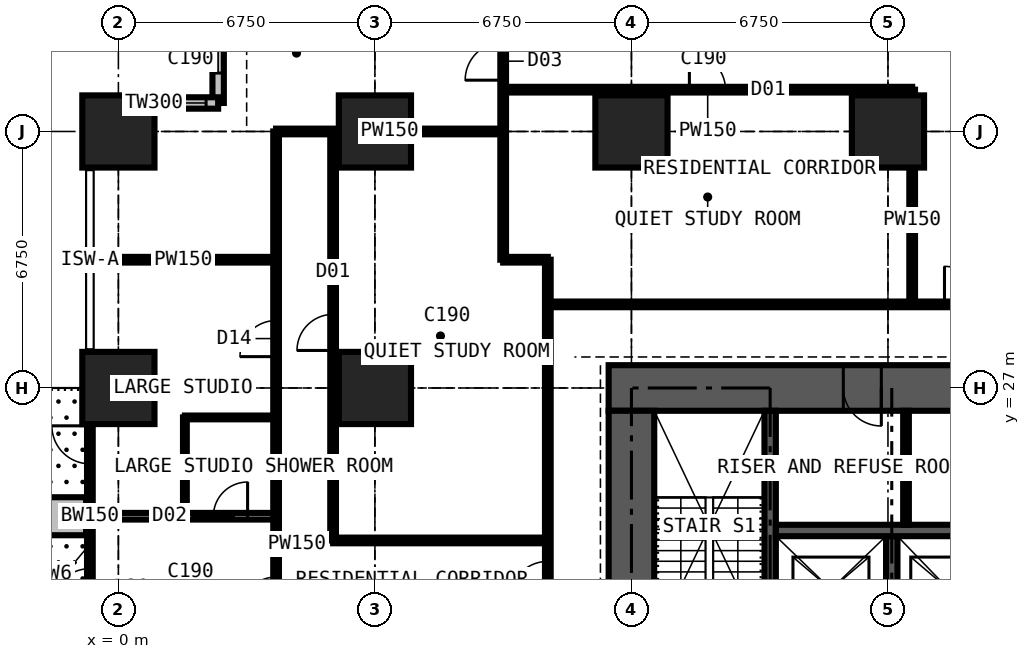
"""IFC4 building model, lengths in metres.
Left out: names, types, materials, properties, quantities, classifications, styles, units other than length and angle.
Written with IfcOpenShell. Run it as: python <this file> out.ifc"""

import sys

from ifc_helpers import new_model, si_unit, direction, frame, frame_2d, origin, origin_2d, place, context, subcontext, project, spatial, rectangle, extrude, element, fill, save


model = new_model("IFC4")
c1 = context("Model", 3, precision=1e-05, world=origin(), true_north=direction((0.0, 1.0)))
c2 = subcontext(c1, "Body", "Model", "MODEL_VIEW")
j1 = project(units=[si_unit("LENGTHUNIT", "METRE"), si_unit("PLANEANGLEUNIT", "RADIAN")], contexts=[c1])
p1 = place(None, origin())
s1 = spatial("IfcSite", under=j1, at=p1, CompositionType="ELEMENT")
p2 = place(p1, origin())
s2 = spatial("IfcBuilding", under=s1, at=p2, CompositionType="ELEMENT")
p3 = place(p2, frame((0.0, 0.0, 28.8)))
s3 = spatial("IfcBuildingStorey", under=s2, at=p3, CompositionType="ELEMENT", Elevation=28.8)
for number, where, z_axis, x_axis in (
    (1, (0.0, 27.0, 0.0), (0.0, 0.0, 1.0), (1.0, 0.0, 0.0)),
    (2, (0.0, 33.75, 0.0), (0.0, 0.0, 1.0), (1.0, 0.0, 0.0)),
    (3, (6.75, 27.0, 0.0), (0.0, 0.0, 1.0), (1.0, 0.0, 0.0)),
    (4, (6.75, 33.75, 0.0), (0.0, 0.0, 1.0), (1.0, 0.0, 0.0)),
    (5, (13.5, 33.75, 0.0), (0.0, 0.0, 1.0), (1.0, 0.0, 0.0)),
    (6, (20.25, 33.75, 0.0), (0.0, 0.0, 1.0), (1.0, 0.0, 0.0)),
):
    element("IfcColumn", number, at=place(p3, frame(where, z_axis=z_axis, x_axis=x_axis)), inside=s3, PredefinedType="COLUMN", context=c2, shape_type="SweptSolid", body=[
        extrude(rectangle(XDim=1.9, YDim=1.9, at=origin_2d()), origin(), (0.0, 0.0, 1.0), 3.6),
    ])
p4 = place(p3, frame((27.6, 27.0, 0.0), z_axis=(0.0, 0.0, 1.0), x_axis=(-1.0, 0.0, 0.0)))
e7 = element("IfcWall", 7, at=p4, inside=s3, PredefinedType="SHEAR", context=c2, shape_type="SweptSolid", body=[
    extrude(rectangle(XDim=14.7, YDim=1.2, at=frame_2d((7.35, 0.0))), origin(), (0.0, 0.0, 1.0), 3.6),
])
p5 = place(p4, frame((4.55, 0.0, 0.0)))
e8 = element("IfcOpeningElement", 8, at=p5, cuts=e7, PredefinedType="OPENING", context=c2, shape_type="SweptSolid", body=[
    extrude(rectangle(XDim=0.9, YDim=2.2, at=frame_2d((0.45, 1.1))), frame((0.0, 0.61, 0.0), z_axis=(0.0, -1.0, 0.0), x_axis=(1.0, 0.0, 0.0)), (0.0, 0.0, 1.0), 1.22),
])
p6 = place(p4, frame((7.525, 0.0, 0.0)))
e9 = element("IfcOpeningElement", 9, at=p6, cuts=e7, PredefinedType="OPENING", context=c2, shape_type="SweptSolid", body=[
    extrude(rectangle(XDim=1.0, YDim=2.2, at=frame_2d((0.5, 1.1))), frame((0.0, 0.61, 0.0), z_axis=(0.0, -1.0, 0.0), x_axis=(1.0, 0.0, 0.0)), (0.0, 0.0, 1.0), 1.22),
])
p7 = place(p3, frame((13.5, 26.4, 0.0), z_axis=(0.0, 0.0, 1.0), x_axis=(0.0, -1.0, 0.0)))
e10 = element("IfcWall", 10, at=p7, inside=s3, PredefinedType="SHEAR", context=c2, shape_type="SweptSolid", body=[
    extrude(rectangle(XDim=12.3, YDim=1.2, at=frame_2d((6.15, 0.0))), origin(), (0.0, 0.0, 1.0), 3.6),
])
p8 = place(p7, frame((7.45, 0.0, 0.0)))
e11 = element("IfcOpeningElement", 11, at=p8, cuts=e10, PredefinedType="OPENING", context=c2, shape_type="SweptSolid", body=[
    extrude(rectangle(XDim=1.2, YDim=2.2, at=frame_2d((0.6, 1.1))), frame((0.0, 0.61, 0.0), z_axis=(0.0, -1.0, 0.0), x_axis=(1.0, 0.0, 0.0)), (0.0, 0.0, 1.0), 1.22),
])
p9 = place(p3, frame((2.625, 37.875, 0.0), z_axis=(0.0, 0.0, 1.0), x_axis=(0.0, -1.0, 0.0)))
e12 = element("IfcWall", 12, at=p9, inside=s3, PredefinedType="SOLIDWALL", context=c2, shape_type="SweptSolid", body=[
    extrude(rectangle(XDim=3.375, YDim=0.3, at=frame_2d((1.688, 0.0))), origin(), (0.0, 0.0, 1.0), 3.375),
])
p10 = place(p9, frame((0.788, 0.0, 0.6)))
e13 = element("IfcOpeningElement", 13, at=p10, cuts=e12, PredefinedType="OPENING", context=c2, shape_type="SweptSolid", body=[
    extrude(rectangle(XDim=1.8, YDim=2.1, at=frame_2d((0.9, 1.05))), frame((0.0, 0.16, 0.0), z_axis=(0.0, -1.0, 0.0), x_axis=(1.0, 0.0, 0.0)), (0.0, 0.0, 1.0), 0.32),
])
p11 = place(p3, frame((2.625, 34.5, 0.0), z_axis=(0.0, 0.0, 1.0), x_axis=(-1.0, 0.0, 0.0)))
e14 = element("IfcWall", 14, at=p11, inside=s3, PredefinedType="SOLIDWALL", context=c2, shape_type="SweptSolid", body=[
    extrude(rectangle(XDim=3.375, YDim=0.3, at=frame_2d((1.688, 0.0))), origin(), (0.0, 0.0, 1.0), 3.375),
])
p12 = place(p11, frame((0.317, 0.0, 0.9)))
e15 = element("IfcOpeningElement", 15, at=p12, cuts=e14, PredefinedType="OPENING", context=c2, shape_type="SweptSolid", body=[
    extrude(rectangle(XDim=1.2, YDim=1.8, at=frame_2d((0.6, 0.9))), frame((0.0, 0.16, 0.0), z_axis=(0.0, -1.0, 0.0), x_axis=(1.0, 0.0, 0.0)), (0.0, 0.0, 1.0), 0.32),
])
p13 = place(p3, frame((-0.75, 20.25, 0.0), z_axis=(0.0, 0.0, 1.0), x_axis=(0.0, 1.0, 0.0)))
e16 = element("IfcWall", 16, at=p13, inside=s3, PredefinedType="SOLIDWALL", context=c2, shape_type="SweptSolid", body=[
    extrude(rectangle(XDim=6.75, YDim=0.15, at=frame_2d((3.375, 0.0))), origin(), (0.0, 0.0, 1.0), 3.375),
])
p14 = place(p13, frame((0.996, 0.0, 0.0)))
e17 = element("IfcOpeningElement", 17, at=p14, cuts=e16, PredefinedType="OPENING", context=c2, shape_type="SweptSolid", body=[
    extrude(rectangle(XDim=1.0, YDim=2.2, at=frame_2d((0.5, 1.1))), frame((0.0, 0.085, 0.0), z_axis=(0.0, -1.0, 0.0), x_axis=(1.0, 0.0, 0.0)), (0.0, 0.0, 1.0), 0.17),
])
p15 = place(p13, frame((2.042, 0.0, 0.9)))
e18 = element("IfcOpeningElement", 18, at=p15, cuts=e16, PredefinedType="OPENING", context=c2, shape_type="SweptSolid", body=[
    extrude(rectangle(XDim=1.2, YDim=1.8, at=frame_2d((0.6, 0.9))), frame((0.0, 0.085, 0.0), z_axis=(0.0, -1.0, 0.0), x_axis=(1.0, 0.0, 0.0)), (0.0, 0.0, 1.0), 0.17),
])
p16 = place(p13, frame((4.754, 0.0, 0.0)))
e19 = element("IfcOpeningElement", 19, at=p16, cuts=e16, PredefinedType="OPENING", context=c2, shape_type="SweptSolid", body=[
    extrude(rectangle(XDim=1.0, YDim=2.2, at=frame_2d((0.5, 1.1))), frame((0.0, 0.085, 0.0), z_axis=(0.0, -1.0, 0.0), x_axis=(1.0, 0.0, 0.0)), (0.0, 0.0, 1.0), 0.17),
])
p17 = place(p13, frame((3.508, 0.0, 0.9)))
e20 = element("IfcOpeningElement", 20, at=p17, cuts=e16, PredefinedType="OPENING", context=c2, shape_type="SweptSolid", body=[
    extrude(rectangle(XDim=1.2, YDim=1.8, at=frame_2d((0.6, 0.9))), frame((0.0, 0.085, 0.0), z_axis=(0.0, -1.0, 0.0), x_axis=(1.0, 0.0, 0.0)), (0.0, 0.0, 1.0), 0.17),
])
p18 = place(p3, frame((-0.85, 23.625, 0.0), z_axis=(0.0, 0.0, 1.0), x_axis=(-1.0, 0.0, 0.0)))
e21 = element("IfcWall", 21, at=p18, inside=s3, PredefinedType="USERDEFINED", context=c2, shape_type="SweptSolid", body=[
    extrude(rectangle(XDim=2.2, YDim=1.0, at=frame_2d((1.1, 0.0))), origin(), (0.0, 0.0, 1.0), 0.9),
])
p19 = place(p3, frame((17.15, 20.3, 0.0), z_axis=(0.0, 0.0, 1.0), x_axis=(0.0, 1.0, 0.0)))
e22 = element("IfcWall", 22, at=p19, inside=s3, PredefinedType="SHEAR", context=c2, shape_type="SweptSolid", body=[
    extrude(rectangle(XDim=6.1, YDim=0.3, at=frame_2d((3.05, 0.0))), origin(), (0.0, 0.0, 1.0), 3.6),
])
p20 = place(p3, frame((20.35, 20.3, 0.0), z_axis=(0.0, 0.0, 1.0), x_axis=(0.0, 1.0, 0.0)))
e23 = element("IfcWall", 23, at=p20, inside=s3, PredefinedType="SHEAR", context=c2, shape_type="SweptSolid", body=[
    extrude(rectangle(XDim=2.8, YDim=0.3, at=frame_2d((1.4, 0.0))), origin(), (0.0, 0.0, 1.0), 3.6),
])
p21 = place(p3, frame((17.3, 23.25, 0.0), z_axis=(0.0, 0.0, 1.0), x_axis=(1.0, 0.0, 0.0)))
e24 = element("IfcWall", 24, at=p21, inside=s3, PredefinedType="SHEAR", context=c2, shape_type="SweptSolid", body=[
    extrude(rectangle(XDim=5.9, YDim=0.3, at=frame_2d((2.95, 0.0))), origin(), (0.0, 0.0, 1.0), 3.6),
])
p22 = place(p3, frame((20.725, 23.4, 0.0), z_axis=(0.0, 0.0, 1.0), x_axis=(0.0, 1.0, 0.0)))
e25 = element("IfcWall", 25, at=p22, inside=s3, PredefinedType="PARTITIONING", context=c2, shape_type="SweptSolid", body=[
    extrude(rectangle(XDim=3.0, YDim=0.15, at=frame_2d((1.5, 0.0))), origin(), (0.0, 0.0, 1.0), 3.375),
])
p23 = place(p3, frame((-0.734, 23.625, 0.0), z_axis=(0.0, 0.0, 1.0), x_axis=(1.0, 0.0, 0.0)))
e26 = element("IfcWall", 26, at=p23, inside=s3, PredefinedType="PARTITIONING", context=c2, shape_type="SweptSolid", body=[
    extrude(rectangle(XDim=4.884, YDim=0.175, at=frame_2d((2.442, 0.0))), origin(), (0.0, 0.0, 1.0), 3.375),
])
p24 = place(p23, frame((3.234, 0.0, 0.0)))
e27 = element("IfcOpeningElement", 27, at=p24, cuts=e26, PredefinedType="OPENING", context=c2, shape_type="SweptSolid", body=[
    extrude(rectangle(XDim=0.9, YDim=2.2, at=frame_2d((0.45, 1.1))), frame((0.0, 0.097, 0.0), z_axis=(0.0, -1.0, 0.0), x_axis=(1.0, 0.0, 0.0)), (0.0, 0.0, 1.0), 0.195),
])
p25 = place(p3, frame((-0.734, 30.375, 0.0), z_axis=(0.0, 0.0, 1.0), x_axis=(1.0, 0.0, 0.0)))
e28 = element("IfcWall", 28, at=p25, inside=s3, PredefinedType="PARTITIONING", context=c2, shape_type="SweptSolid", body=[
    extrude(rectangle(XDim=4.884, YDim=0.15, at=frame_2d((2.442, 0.0))), origin(), (0.0, 0.0, 1.0), 3.375),
])
p26 = place(p3, frame((1.75, 23.625, 0.0), z_axis=(0.0, 0.0, 1.0), x_axis=(0.0, 1.0, 0.0)))
e29 = element("IfcWall", 29, at=p26, inside=s3, PredefinedType="PARTITIONING", context=c2, shape_type="SweptSolid", body=[
    extrude(rectangle(XDim=2.6, YDim=0.1, at=frame_2d((1.3, 0.0))), origin(), (0.0, 0.0, 1.0), 3.375),
])
p27 = place(p3, frame((1.75, 26.225, 0.0), z_axis=(0.0, 0.0, 1.0), x_axis=(1.0, 0.0, 0.0)))
e30 = element("IfcWall", 30, at=p27, inside=s3, PredefinedType="PARTITIONING", context=c2, shape_type="SweptSolid", body=[
    extrude(rectangle(XDim=2.4, YDim=0.1, at=frame_2d((1.2, 0.0))), origin(), (0.0, 0.0, 1.0), 3.375),
])
p28 = place(p3, frame((4.15, 10.125, 0.0), z_axis=(0.0, 0.0, 1.0), x_axis=(0.0, 1.0, 0.0)))
e31 = element("IfcWall", 31, at=p28, inside=s3, PredefinedType="PARTITIONING", context=c2, shape_type="SweptSolid", body=[
    extrude(rectangle(XDim=23.625, YDim=0.15, at=frame_2d((11.812, 0.0))), origin(), (0.0, 0.0, 1.0), 3.375),
])
p29 = place(p28, frame((4.2, 0.0, 0.0)))
e32 = element("IfcOpeningElement", 32, at=p29, cuts=e31, PredefinedType="OPENING", context=c2, shape_type="SweptSolid", body=[
    extrude(rectangle(XDim=0.95, YDim=2.2, at=frame_2d((0.475, 1.1))), frame((0.0, 0.085, 0.0), z_axis=(0.0, -1.0, 0.0), x_axis=(1.0, 0.0, 0.0)), (0.0, 0.0, 1.0), 0.17),
])
p30 = place(p28, frame((10.95, 0.0, 0.0)))
e33 = element("IfcOpeningElement", 33, at=p30, cuts=e31, PredefinedType="OPENING", context=c2, shape_type="SweptSolid", body=[
    extrude(rectangle(XDim=0.95, YDim=2.2, at=frame_2d((0.475, 1.1))), frame((0.0, 0.085, 0.0), z_axis=(0.0, -1.0, 0.0), x_axis=(1.0, 0.0, 0.0)), (0.0, 0.0, 1.0), 0.17),
])
p31 = place(p28, frame((17.7, 0.0, 0.0)))
e34 = element("IfcOpeningElement", 34, at=p31, cuts=e31, PredefinedType="OPENING", context=c2, shape_type="SweptSolid", body=[
    extrude(rectangle(XDim=0.95, YDim=2.2, at=frame_2d((0.475, 1.1))), frame((0.0, 0.085, 0.0), z_axis=(0.0, -1.0, 0.0), x_axis=(1.0, 0.0, 0.0)), (0.0, 0.0, 1.0), 0.17),
])
p32 = place(p3, frame((4.15, 33.75, 0.0), z_axis=(0.0, 0.0, 1.0), x_axis=(1.0, 0.0, 0.0)))
e35 = element("IfcWall", 35, at=p32, inside=s3, PredefinedType="PARTITIONING", context=c2, shape_type="SweptSolid", body=[
    extrude(rectangle(XDim=5.975, YDim=0.15, at=frame_2d((2.988, 0.0))), origin(), (0.0, 0.0, 1.0), 2.877),
])
p33 = place(p3, frame((5.65, 22.988, 0.0), z_axis=(0.0, 0.0, 1.0), x_axis=(0.0, 1.0, 0.0)))
e36 = element("IfcWall", 36, at=p33, inside=s3, PredefinedType="PARTITIONING", context=c2, shape_type="SweptSolid", body=[
    extrude(rectangle(XDim=10.762, YDim=0.15, at=frame_2d((5.381, 0.0))), origin(), (0.0, 0.0, 1.0), 3.375),
])
p34 = place(p33, frame((5.0, 0.0, 0.0)))
e37 = element("IfcOpeningElement", 37, at=p34, cuts=e36, PredefinedType="OPENING", context=c2, shape_type="SweptSolid", body=[
    extrude(rectangle(XDim=0.95, YDim=2.2, at=frame_2d((0.475, 1.1))), frame((0.0, 0.085, 0.0), z_axis=(0.0, -1.0, 0.0), x_axis=(1.0, 0.0, 0.0)), (0.0, 0.0, 1.0), 0.17),
])
p35 = place(p3, frame((5.65, 22.988, 0.0), z_axis=(0.0, 0.0, 1.0), x_axis=(1.0, 0.0, 0.0)))
e38 = element("IfcWall", 38, at=p35, inside=s3, PredefinedType="PARTITIONING", context=c2, shape_type="SweptSolid", body=[
    extrude(rectangle(XDim=5.65, YDim=0.15, at=frame_2d((2.825, 0.0))), origin(), (0.0, 0.0, 1.0), 3.375),
])
p36 = place(p3, frame((10.125, 30.375, 0.0), z_axis=(0.0, 0.0, 1.0), x_axis=(0.0, 1.0, 0.0)))
e39 = element("IfcWall", 39, at=p36, inside=s3, PredefinedType="PARTITIONING", context=c2, shape_type="SweptSolid", body=[
    extrude(rectangle(XDim=10.859, YDim=0.15, at=frame_2d((5.429, 0.0))), origin(), (0.0, 0.0, 1.0), 3.375),
])
p37 = place(p36, frame((4.725, 0.0, 0.0)))
e40 = element("IfcOpeningElement", 40, at=p37, cuts=e39, PredefinedType="OPENING", context=c2, shape_type="SweptSolid", body=[
    extrude(rectangle(XDim=1.0, YDim=2.2, at=frame_2d((0.5, 1.1))), frame((0.0, 0.085, 0.0), z_axis=(0.0, -1.0, 0.0), x_axis=(1.0, 0.0, 0.0)), (0.0, 0.0, 1.0), 0.17),
])
p38 = place(p3, frame((10.125, 30.375, 0.0), z_axis=(0.0, 0.0, 1.0), x_axis=(1.0, 0.0, 0.0)))
e41 = element("IfcWall", 41, at=p38, inside=s3, PredefinedType="PARTITIONING", context=c2, shape_type="SweptSolid", body=[
    extrude(rectangle(XDim=1.175, YDim=0.15, at=frame_2d((0.587, 0.0))), origin(), (0.0, 0.0, 1.0), 3.375),
])
p39 = place(p3, frame((10.125, 34.85, 0.0), z_axis=(0.0, 0.0, 1.0), x_axis=(1.0, 0.0, 0.0)))
e42 = element("IfcWall", 42, at=p39, inside=s3, PredefinedType="PARTITIONING", context=c2, shape_type="SweptSolid", body=[
    extrude(rectangle(XDim=10.762, YDim=0.15, at=frame_2d((5.381, 0.0))), origin(), (0.0, 0.0, 1.0), 3.375),
])
p40 = place(p39, frame((4.9, 0.0, 0.0)))
e43 = element("IfcOpeningElement", 43, at=p40, cuts=e42, PredefinedType="OPENING", context=c2, shape_type="SweptSolid", body=[
    extrude(rectangle(XDim=0.95, YDim=2.2, at=frame_2d((0.475, 1.1))), frame((0.0, 0.085, 0.0), z_axis=(0.0, -1.0, 0.0), x_axis=(1.0, 0.0, 0.0)), (0.0, 0.0, 1.0), 0.17),
])
p41 = place(p3, frame((11.3, 11.3, 0.0), z_axis=(0.0, 0.0, 1.0), x_axis=(0.0, 1.0, 0.0)))
e44 = element("IfcWall", 44, at=p41, inside=s3, PredefinedType="PARTITIONING", context=c2, shape_type="SweptSolid", body=[
    extrude(rectangle(XDim=19.075, YDim=0.15, at=frame_2d((9.538, 0.0))), origin(), (0.0, 0.0, 1.0), 3.375),
])
p42 = place(p41, frame((10.137, 0.0, 0.0)))
e45 = element("IfcOpeningElement", 45, at=p42, cuts=e44, PredefinedType="OPENING", context=c2, shape_type="SweptSolid", body=[
    extrude(rectangle(XDim=1.0, YDim=2.2, at=frame_2d((0.5, 1.1))), frame((0.0, 0.085, 0.0), z_axis=(0.0, -1.0, 0.0), x_axis=(1.0, 0.0, 0.0)), (0.0, 0.0, 1.0), 0.17),
])
p43 = place(p3, frame((11.3, 29.2, 0.0), z_axis=(0.0, 0.0, 1.0), x_axis=(1.0, 0.0, 0.0)))
e46 = element("IfcWall", 46, at=p43, inside=s3, PredefinedType="PARTITIONING", context=c2, shape_type="SweptSolid", body=[
    extrude(rectangle(XDim=19.075, YDim=0.15, at=frame_2d((9.538, 0.0))), origin(), (0.0, 0.0, 1.0), 3.375),
])
p44 = place(p43, frame((12.875, 0.0, 0.0)))
e47 = element("IfcOpeningElement", 47, at=p44, cuts=e46, PredefinedType="OPENING", context=c2, shape_type="SweptSolid", body=[
    extrude(rectangle(XDim=1.0, YDim=2.2, at=frame_2d((0.5, 1.1))), frame((0.0, 0.085, 0.0), z_axis=(0.0, -1.0, 0.0), x_axis=(1.0, 0.0, 0.0)), (0.0, 0.0, 1.0), 0.17),
])
p45 = place(p43, frame((10.438, 0.0, 0.0)))
e48 = element("IfcOpeningElement", 48, at=p45, cuts=e46, PredefinedType="OPENING", context=c2, shape_type="SweptSolid", body=[
    extrude(rectangle(XDim=1.0, YDim=2.2, at=frame_2d((0.5, 1.1))), frame((0.0, 0.085, 0.0), z_axis=(0.0, -1.0, 0.0), x_axis=(1.0, 0.0, 0.0)), (0.0, 0.0, 1.0), 0.17),
])
p46 = place(p43, frame((14.875, 0.0, 0.0)))
e49 = element("IfcOpeningElement", 49, at=p46, cuts=e46, PredefinedType="OPENING", context=c2, shape_type="SweptSolid", body=[
    extrude(rectangle(XDim=0.95, YDim=2.2, at=frame_2d((0.475, 1.1))), frame((0.0, 0.085, 0.0), z_axis=(0.0, -1.0, 0.0), x_axis=(1.0, 0.0, 0.0)), (0.0, 0.0, 1.0), 0.17),
])
p47 = place(p3, frame((20.887, 29.2, 0.0), z_axis=(0.0, 0.0, 1.0), x_axis=(0.0, 1.0, 0.0)))
e50 = element("IfcWall", 50, at=p47, inside=s3, PredefinedType="PARTITIONING", context=c2, shape_type="SweptSolid", body=[
    extrude(rectangle(XDim=5.65, YDim=0.15, at=frame_2d((2.825, 0.0))), origin(), (0.0, 0.0, 1.0), 3.375),
])
p48 = place(p10, origin())
e51 = element("IfcWindow", 51, at=p48, inside=s3, PartitioningType="SINGLE_PANEL", PredefinedType="WINDOW", context=c2, shape_type="SweptSolid", body=[
    extrude(rectangle(XDim=1.8, YDim=2.1, at=frame_2d((0.9, 1.05))), frame((0.0, 0.03, 0.0), z_axis=(0.0, -1.0, 0.0), x_axis=(1.0, 0.0, 0.0)), (0.0, 0.0, 1.0), 0.06),
])
fill(e13, e51)
p49 = place(p12, origin())
e52 = element("IfcWindow", 52, at=p49, inside=s3, PartitioningType="SINGLE_PANEL", PredefinedType="WINDOW", context=c2, shape_type="SweptSolid", body=[
    extrude(rectangle(XDim=1.2, YDim=1.8, at=frame_2d((0.6, 0.9))), frame((0.0, 0.03, 0.0), z_axis=(0.0, -1.0, 0.0), x_axis=(1.0, 0.0, 0.0)), (0.0, 0.0, 1.0), 0.06),
])
fill(e15, e52)
p50 = place(p14, origin())
e53 = element("IfcDoor", 53, at=p50, inside=s3, OperationType="SINGLE_SWING_LEFT", PredefinedType="DOOR", context=c2, shape_type="SweptSolid", body=[
    extrude(rectangle(XDim=1.0, YDim=2.2, at=frame_2d((0.5, 1.1))), frame((0.0, 0.025, 0.0), z_axis=(0.0, -1.0, 0.0), x_axis=(1.0, 0.0, 0.0)), (0.0, 0.0, 1.0), 0.05),
])
fill(e17, e53)
p51 = place(p15, origin())
e54 = element("IfcWindow", 54, at=p51, inside=s3, PartitioningType="SINGLE_PANEL", PredefinedType="WINDOW", context=c2, shape_type="SweptSolid", body=[
    extrude(rectangle(XDim=1.2, YDim=1.8, at=frame_2d((0.6, 0.9))), frame((0.0, 0.03, 0.0), z_axis=(0.0, -1.0, 0.0), x_axis=(1.0, 0.0, 0.0)), (0.0, 0.0, 1.0), 0.06),
])
fill(e18, e54)
p52 = place(p16, origin())
e55 = element("IfcDoor", 55, at=p52, inside=s3, OperationType="SINGLE_SWING_RIGHT", PredefinedType="DOOR", context=c2, shape_type="SweptSolid", body=[
    extrude(rectangle(XDim=1.0, YDim=2.2, at=frame_2d((0.5, 1.1))), frame((0.0, 0.025, 0.0), z_axis=(0.0, -1.0, 0.0), x_axis=(1.0, 0.0, 0.0)), (0.0, 0.0, 1.0), 0.05),
])
fill(e19, e55)
p53 = place(p17, origin())
e56 = element("IfcWindow", 56, at=p53, inside=s3, PartitioningType="SINGLE_PANEL", PredefinedType="WINDOW", context=c2, shape_type="SweptSolid", body=[
    extrude(rectangle(XDim=1.2, YDim=1.8, at=frame_2d((0.6, 0.9))), frame((0.0, 0.03, 0.0), z_axis=(0.0, -1.0, 0.0), x_axis=(1.0, 0.0, 0.0)), (0.0, 0.0, 1.0), 0.06),
])
fill(e20, e56)
p54 = place(p6, origin())
e57 = element("IfcDoor", 57, at=p54, inside=s3, OperationType="SINGLE_SWING_LEFT", PredefinedType="DOOR", context=c2, shape_type="SweptSolid", body=[
    extrude(rectangle(XDim=1.0, YDim=2.2, at=frame_2d((0.5, 1.1))), frame((0.0, 0.025, 0.0), z_axis=(0.0, -1.0, 0.0), x_axis=(1.0, 0.0, 0.0)), (0.0, 0.0, 1.0), 0.05),
])
fill(e9, e57)
p55 = place(p45, origin())
e58 = element("IfcDoor", 58, at=p55, inside=s3, OperationType="SINGLE_SWING_LEFT", PredefinedType="DOOR", context=c2, shape_type="SweptSolid", body=[
    extrude(rectangle(XDim=1.0, YDim=2.2, at=frame_2d((0.5, 1.1))), frame((0.0, 0.025, 0.0), z_axis=(0.0, -1.0, 0.0), x_axis=(1.0, 0.0, 0.0)), (0.0, 0.0, 1.0), 0.05),
])
fill(e48, e58)
p56 = place(p40, origin())
e59 = element("IfcDoor", 59, at=p56, inside=s3, OperationType="SINGLE_SWING_LEFT", PredefinedType="DOOR", context=c2, shape_type="SweptSolid", body=[
    extrude(rectangle(XDim=0.95, YDim=2.2, at=frame_2d((0.475, 1.1))), frame((0.0, 0.025, 0.0), z_axis=(0.0, -1.0, 0.0), x_axis=(1.0, 0.0, 0.0)), (0.0, 0.0, 1.0), 0.05),
])
fill(e43, e59)
p57 = place(p37, origin())
e60 = element("IfcDoor", 60, at=p57, inside=s3, OperationType="SINGLE_SWING_LEFT", PredefinedType="DOOR", context=c2, shape_type="SweptSolid", body=[
    extrude(rectangle(XDim=1.0, YDim=2.2, at=frame_2d((0.5, 1.1))), frame((0.0, 0.025, 0.0), z_axis=(0.0, -1.0, 0.0), x_axis=(1.0, 0.0, 0.0)), (0.0, 0.0, 1.0), 0.05),
])
fill(e40, e60)
p58 = place(p30, origin())
e61 = element("IfcDoor", 61, at=p58, inside=s3, OperationType="SINGLE_SWING_LEFT", PredefinedType="DOOR", context=c2, shape_type="SweptSolid", body=[
    extrude(rectangle(XDim=0.95, YDim=2.2, at=frame_2d((0.475, 1.1))), frame((0.0, 0.025, 0.0), z_axis=(0.0, -1.0, 0.0), x_axis=(1.0, 0.0, 0.0)), (0.0, 0.0, 1.0), 0.05),
])
fill(e33, e61)
p59 = place(p31, origin())
e62 = element("IfcDoor", 62, at=p59, inside=s3, OperationType="SINGLE_SWING_LEFT", PredefinedType="DOOR", context=c2, shape_type="SweptSolid", body=[
    extrude(rectangle(XDim=0.95, YDim=2.2, at=frame_2d((0.475, 1.1))), frame((0.0, 0.025, 0.0), z_axis=(0.0, -1.0, 0.0), x_axis=(1.0, 0.0, 0.0)), (0.0, 0.0, 1.0), 0.05),
])
fill(e34, e62)
p60 = place(p24, origin())
e63 = element("IfcDoor", 63, at=p60, inside=s3, OperationType="SINGLE_SWING_RIGHT", PredefinedType="DOOR", context=c2, shape_type="SweptSolid", body=[
    extrude(rectangle(XDim=0.9, YDim=2.2, at=frame_2d((0.45, 1.1))), frame((0.0, 0.025, 0.0), z_axis=(0.0, -1.0, 0.0), x_axis=(1.0, 0.0, 0.0)), (0.0, 0.0, 1.0), 0.05),
])
fill(e27, e63)
p61 = place(p42, origin())
e64 = element("IfcDoor", 64, at=p61, inside=s3, OperationType="SINGLE_SWING_LEFT", PredefinedType="DOOR", context=c2, shape_type="SweptSolid", body=[
    extrude(rectangle(XDim=1.0, YDim=2.2, at=frame_2d((0.5, 1.1))), frame((0.0, 0.025, 0.0), z_axis=(0.0, -1.0, 0.0), x_axis=(1.0, 0.0, 0.0)), (0.0, 0.0, 1.0), 0.05),
])
fill(e45, e64)
p62 = place(p34, origin())
e65 = element("IfcDoor", 65, at=p62, inside=s3, OperationType="SINGLE_SWING_LEFT", PredefinedType="DOOR", context=c2, shape_type="SweptSolid", body=[
    extrude(rectangle(XDim=0.95, YDim=2.2, at=frame_2d((0.475, 1.1))), frame((0.0, 0.025, 0.0), z_axis=(0.0, -1.0, 0.0), x_axis=(1.0, 0.0, 0.0)), (0.0, 0.0, 1.0), 0.05),
])
fill(e37, e65)
save(model, sys.argv[1])
